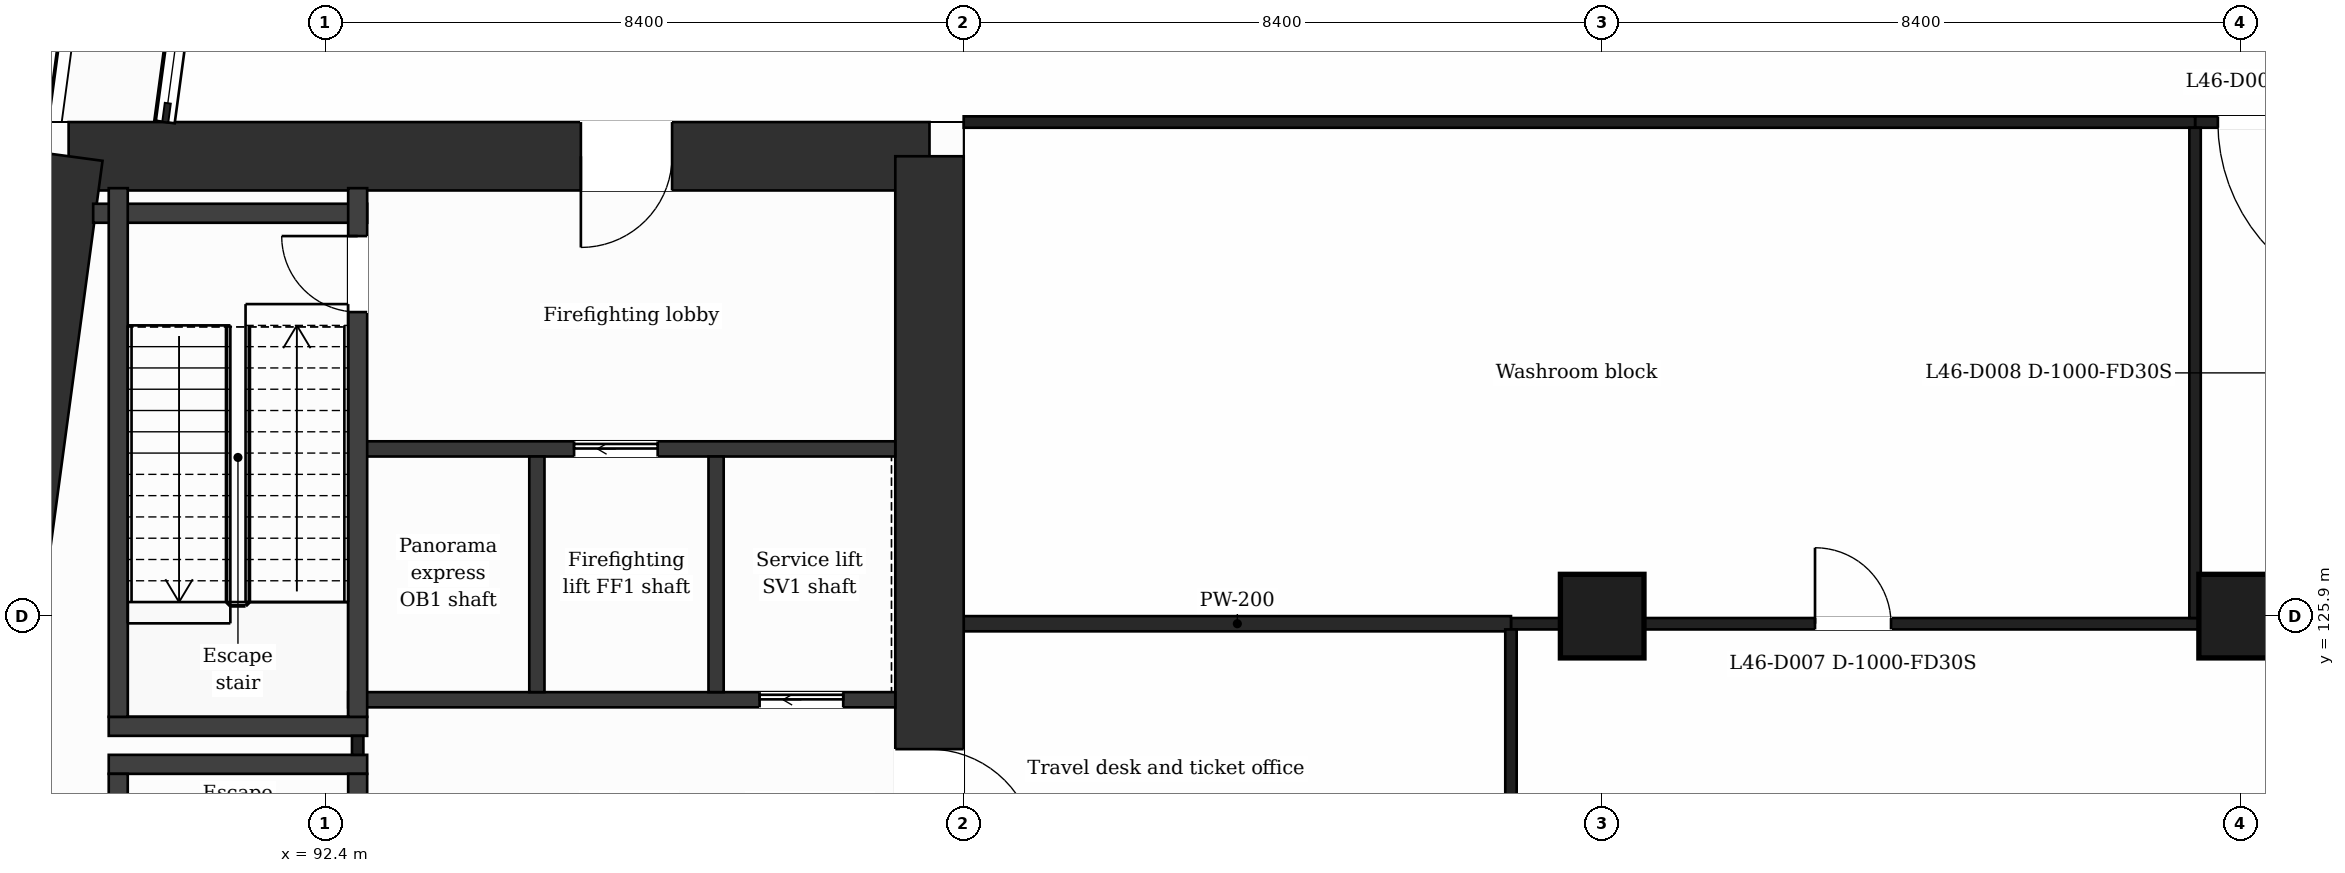
"""IFC4 building model, lengths in metres.
Left out: names, types, materials, properties, quantities, classifications, styles, units other than length and angle.
Written with IfcOpenShell. Run it as: python <this file> out.ifc"""

import sys

from ifc_helpers import new_model, si_unit, direction, frame, frame_2d, origin, origin_2d, place, context, subcontext, project, spatial, rectangle, extrude, element, fill, save


model = new_model("IFC4")
c1 = context("Model", 3, precision=1e-05, world=origin(), true_north=direction((0.0, 1.0)))
c2 = subcontext(c1, "Body", "Model", "MODEL_VIEW")
j1 = project(units=[si_unit("LENGTHUNIT", "METRE"), si_unit("PLANEANGLEUNIT", "RADIAN")], contexts=[c1])
p1 = place(None, origin())
s1 = spatial("IfcSite", under=j1, at=p1, CompositionType="ELEMENT")
p2 = place(p1, origin())
s2 = spatial("IfcBuilding", under=s1, at=p2, CompositionType="ELEMENT")
p3 = place(p2, frame((0.0, 0.0, 192.2)))
s3 = spatial("IfcBuildingStorey", under=s2, at=p3, CompositionType="ELEMENT", Elevation=192.2)
p4 = place(p3, frame((89.024, 131.95, 0.0), z_axis=(0.0, 0.0, 1.0), x_axis=(1.0, 0.0, 0.0)))
e1 = element("IfcWall", 1, at=p4, inside=s3, PredefinedType="SHEAR", context=c2, shape_type="SweptSolid", body=[
    extrude(rectangle(XDim=11.326, YDim=0.9, at=frame_2d((5.663, 0.0))), origin(), (0.0, 0.0, 1.0), 5.0),
])
p5 = place(p4, frame((6.739, 0.0, 0.0)))
e2 = element("IfcOpeningElement", 2, at=p5, cuts=e1, PredefinedType="OPENING", context=c2, shape_type="SweptSolid", body=[
    extrude(rectangle(XDim=1.2, YDim=2.1, at=frame_2d((0.6, 1.05))), frame((0.0, 0.46, 0.0), z_axis=(0.0, -1.0, 0.0), x_axis=(1.0, 0.0, 0.0)), (0.0, 0.0, 1.0), 0.92),
])
p6 = place(p3, frame((100.35, 131.95, 0.0), z_axis=(0.0, 0.0, 1.0), x_axis=(0.0, -1.0, 0.0)))
e3 = element("IfcWall", 3, at=p6, inside=s3, PredefinedType="SHEAR", context=c2, shape_type="SweptSolid", body=[
    extrude(rectangle(XDim=21.1, YDim=0.9, at=frame_2d((10.55, 0.0))), origin(), (0.0, 0.0, 1.0), 5.0),
])
p7 = place(p6, frame((7.8, 0.0, 0.0)))
e4 = element("IfcOpeningElement", 4, at=p7, cuts=e3, PredefinedType="OPENING", context=c2, shape_type="SweptSolid", body=[
    extrude(rectangle(XDim=1.4, YDim=2.1, at=frame_2d((0.7, 1.05))), frame((0.0, 0.46, 0.0), z_axis=(0.0, -1.0, 0.0), x_axis=(1.0, 0.0, 0.0)), (0.0, 0.0, 1.0), 0.92),
])
p8 = place(p3, frame((86.184, 110.85, 0.0), z_axis=(0.0, 0.0, 1.0), x_axis=(0.133410495943, 0.991060865725, 0.0)))
e5 = element("IfcWall", 5, at=p8, inside=s3, PredefinedType="SHEAR", context=c2, shape_type="SweptSolid", body=[
    extrude(rectangle(XDim=21.29, YDim=0.9, at=frame_2d((10.645, 0.0))), origin(), (0.0, 0.0, 1.0), 5.0),
])
for number, where, z_axis, x_axis in (
    (6, (109.2, 125.9, 0.0), (0.0, 0.0, 1.0), (1.0, 0.0, 0.0)),
    (7, (117.6, 125.9, 0.0), (0.0, 0.0, 1.0), (1.0, 0.0, 0.0)),
):
    element("IfcColumn", number, at=place(p3, frame(where, z_axis=z_axis, x_axis=x_axis)), inside=s3, PredefinedType="COLUMN", context=c2, shape_type="SweptSolid", body=[
        extrude(rectangle(XDim=1.1, YDim=1.1, at=origin_2d()), origin(), (0.0, 0.0, 1.0), 5.0),
    ])
for number, where, z_axis, x_axis in (
    (8, (89.552, 123.95, 0.0), (0.0, 0.0, 1.0), (1.0, 0.0, 0.0)),
    (9, (89.552, 124.45, 0.0), (0.0, 0.0, 1.0), (1.0, 0.0, 0.0)),
):
    element("IfcWall", number, at=place(p3, frame(where, z_axis=z_axis, x_axis=x_axis)), inside=s3, PredefinedType="PARTITIONING", context=c2, shape_type="SweptSolid", body=[
        extrude(rectangle(XDim=3.4, YDim=0.25, at=frame_2d((1.7, 0.0))), origin(), (0.0, 0.0, 1.0), 4.5),
    ])
p9 = place(p3, frame((92.702, 124.8, 0.0), z_axis=(0.0, 0.0, 1.0), x_axis=(1.0, 0.0, 0.0)))
e10 = element("IfcWall", 10, at=p9, inside=s3, PredefinedType="PARTITIONING", context=c2, shape_type="SweptSolid", body=[
    extrude(rectangle(XDim=7.198, YDim=0.2, at=frame_2d((3.599, 0.0))), origin(), (0.0, 0.0, 1.0), 4.5),
])
p10 = place(p9, frame((5.413, 0.0, 0.0)))
e11 = element("IfcOpeningElement", 11, at=p10, cuts=e10, PredefinedType="OPENING", context=c2, shape_type="SweptSolid", body=[
    extrude(rectangle(XDim=1.1, YDim=2.1, at=frame_2d((0.55, 1.05))), frame((0.0, 0.11, 0.0), z_axis=(0.0, -1.0, 0.0), x_axis=(1.0, 0.0, 0.0)), (0.0, 0.0, 1.0), 0.22),
])
p11 = place(p3, frame((108.0, 125.8, 0.0), z_axis=(0.0, 0.0, 1.0), x_axis=(1.0, 0.0, 0.0)))
e12 = element("IfcWall", 12, at=p11, inside=s3, PredefinedType="PARTITIONING", context=c2, shape_type="SweptSolid", body=[
    extrude(rectangle(XDim=9.075, YDim=0.15, at=frame_2d((4.538, 0.0))), origin(), (0.0, 0.0, 1.0), 4.5),
])
p12 = place(p11, frame((4.0, 0.0, 0.0)))
e13 = element("IfcOpeningElement", 13, at=p12, cuts=e12, PredefinedType="OPENING", context=c2, shape_type="SweptSolid", body=[
    extrude(rectangle(XDim=1.0, YDim=2.1, at=frame_2d((0.5, 1.05))), frame((0.0, 0.085, 0.0), z_axis=(0.0, -1.0, 0.0), x_axis=(1.0, 0.0, 0.0)), (0.0, 0.0, 1.0), 0.17),
])
p13 = place(p3, frame((100.8, 125.8, 0.0), z_axis=(0.0, 0.0, 1.0), x_axis=(1.0, 0.0, 0.0)))
e14 = element("IfcWall", 14, at=p13, inside=s3, PredefinedType="PARTITIONING", context=c2, shape_type="SweptSolid", body=[
    extrude(rectangle(XDim=7.2, YDim=0.2, at=frame_2d((3.6, 0.0))), origin(), (0.0, 0.0, 1.0), 4.5),
])
p14 = place(p3, frame((92.827, 128.1, 0.0), z_axis=(0.0, 0.0, 1.0), x_axis=(1.0, 0.0, 0.0)))
e15 = element("IfcWall", 15, at=p14, inside=s3, PredefinedType="PARTITIONING", context=c2, shape_type="SweptSolid", body=[
    extrude(rectangle(XDim=7.073, YDim=0.2, at=frame_2d((3.537, 0.0))), origin(), (0.0, 0.0, 1.0), 4.5),
])
p15 = place(p14, frame((2.847, 0.0, 0.0)))
e16 = element("IfcOpeningElement", 16, at=p15, cuts=e15, PredefinedType="OPENING", context=c2, shape_type="SweptSolid", body=[
    extrude(rectangle(XDim=1.1, YDim=2.1, at=frame_2d((0.55, 1.05))), frame((0.0, 0.11, 0.0), z_axis=(0.0, -1.0, 0.0), x_axis=(1.0, 0.0, 0.0)), (0.0, 0.0, 1.0), 0.22),
])
p16 = place(p3, frame((89.347, 131.2, 0.0), z_axis=(0.0, 0.0, 1.0), x_axis=(1.0, 0.0, 0.0)))
e17 = element("IfcWall", 17, at=p16, inside=s3, PredefinedType="PARTITIONING", context=c2, shape_type="SweptSolid", body=[
    extrude(rectangle(XDim=3.604, YDim=0.25, at=frame_2d((1.802, 0.0))), origin(), (0.0, 0.0, 1.0), 4.5),
])
p17 = place(p3, frame((117.0, 132.4, 0.0), z_axis=(0.0, 0.0, 1.0), x_axis=(1.0, 0.0, 0.0)))
e18 = element("IfcWall", 18, at=p17, inside=s3, PredefinedType="PARTITIONING", context=c2, shape_type="SweptSolid", body=[
    extrude(rectangle(XDim=3.0, YDim=0.15, at=frame_2d((1.5, 0.0))), origin(), (0.0, 0.0, 1.0), 4.5),
])
p18 = place(p17, frame((0.3, 0.0, 0.0)))
e19 = element("IfcOpeningElement", 19, at=p18, cuts=e18, PredefinedType="OPENING", context=c2, shape_type="SweptSolid", body=[
    extrude(rectangle(XDim=2.4, YDim=2.1, at=frame_2d((1.2, 1.05))), frame((0.0, 0.085, 0.0), z_axis=(0.0, -1.0, 0.0), x_axis=(1.0, 0.0, 0.0)), (0.0, 0.0, 1.0), 0.17),
])
p19 = place(p3, frame((100.8, 132.4, 0.0), z_axis=(0.0, 0.0, 1.0), x_axis=(1.0, 0.0, 0.0)))
e20 = element("IfcWall", 20, at=p19, inside=s3, PredefinedType="PARTITIONING", context=c2, shape_type="SweptSolid", body=[
    extrude(rectangle(XDim=16.2, YDim=0.15, at=frame_2d((8.1, 0.0))), origin(), (0.0, 0.0, 1.0), 4.5),
])
p20 = place(p3, frame((89.677, 116.87, 0.0), z_axis=(0.0, 0.0, 1.0), x_axis=(0.0, 1.0, 0.0)))
e21 = element("IfcWall", 21, at=p20, inside=s3, PredefinedType="PARTITIONING", context=c2, shape_type="SweptSolid", body=[
    extrude(rectangle(XDim=6.955, YDim=0.25, at=frame_2d((3.478, 0.0))), origin(), (0.0, 0.0, 1.0), 4.5),
])
p21 = place(p3, frame((89.677, 124.575, 0.0), z_axis=(0.0, 0.0, 1.0), x_axis=(0.0, 1.0, 0.0)))
e22 = element("IfcWall", 22, at=p21, inside=s3, PredefinedType="PARTITIONING", context=c2, shape_type="SweptSolid", body=[
    extrude(rectangle(XDim=6.955, YDim=0.25, at=frame_2d((3.478, 0.0))), origin(), (0.0, 0.0, 1.0), 4.5),
])
p22 = place(p3, frame((92.827, 124.075, 0.0), z_axis=(0.0, 0.0, 1.0), x_axis=(0.0, 1.0, 0.0)))
e23 = element("IfcWall", 23, at=p22, inside=s3, PredefinedType="PARTITIONING", context=c2, shape_type="SweptSolid", body=[
    extrude(rectangle(XDim=0.25, YDim=0.15, at=frame_2d((0.125, 0.0))), origin(), (0.0, 0.0, 1.0), 4.5),
])
p23 = place(p3, frame((92.827, 116.87, 0.0), z_axis=(0.0, 0.0, 1.0), x_axis=(0.0, 1.0, 0.0)))
e24 = element("IfcWall", 24, at=p23, inside=s3, PredefinedType="PARTITIONING", context=c2, shape_type="SweptSolid", body=[
    extrude(rectangle(XDim=6.955, YDim=0.25, at=frame_2d((3.478, 0.0))), origin(), (0.0, 0.0, 1.0), 4.5),
])
p24 = place(p23, frame((5.655, 0.0, 0.0)))
e25 = element("IfcOpeningElement", 25, at=p24, cuts=e24, PredefinedType="OPENING", context=c2, shape_type="SweptSolid", body=[
    extrude(rectangle(XDim=0.95, YDim=2.1, at=frame_2d((0.475, 1.05))), frame((0.0, 0.135, 0.0), z_axis=(0.0, -1.0, 0.0), x_axis=(1.0, 0.0, 0.0)), (0.0, 0.0, 1.0), 0.27),
])
p25 = place(p3, frame((92.827, 124.575, 0.0), z_axis=(0.0, 0.0, 1.0), x_axis=(0.0, 1.0, 0.0)))
e26 = element("IfcWall", 26, at=p25, inside=s3, PredefinedType="PARTITIONING", context=c2, shape_type="SweptSolid", body=[
    extrude(rectangle(XDim=6.955, YDim=0.25, at=frame_2d((3.478, 0.0))), origin(), (0.0, 0.0, 1.0), 4.5),
])
p26 = place(p25, frame((5.325, 0.0, 0.0)))
e27 = element("IfcOpeningElement", 27, at=p26, cuts=e26, PredefinedType="OPENING", context=c2, shape_type="SweptSolid", body=[
    extrude(rectangle(XDim=1.0, YDim=2.1, at=frame_2d((0.5, 1.05))), frame((0.0, 0.135, 0.0), z_axis=(0.0, -1.0, 0.0), x_axis=(1.0, 0.0, 0.0)), (0.0, 0.0, 1.0), 0.27),
])
for number, where, z_axis, x_axis in (
    (28, (95.185, 124.9, 0.0), (0.0, 0.0, 1.0), (0.0, 1.0, 0.0)),
    (29, (97.542, 124.9, 0.0), (0.0, 0.0, 1.0), (0.0, 1.0, 0.0)),
):
    element("IfcWall", number, at=place(p3, frame(where, z_axis=z_axis, x_axis=x_axis)), inside=s3, PredefinedType="PARTITIONING", context=c2, shape_type="SweptSolid", body=[
        extrude(rectangle(XDim=3.1, YDim=0.2, at=frame_2d((1.55, 0.0))), origin(), (0.0, 0.0, 1.0), 4.5),
    ])
p27 = place(p3, frame((108.0, 120.375, 0.0), z_axis=(0.0, 0.0, 1.0), x_axis=(0.0, 1.0, 0.0)))
e30 = element("IfcWall", 30, at=p27, inside=s3, PredefinedType="PARTITIONING", context=c2, shape_type="SweptSolid", body=[
    extrude(rectangle(XDim=5.35, YDim=0.15, at=frame_2d((2.675, 0.0))), origin(), (0.0, 0.0, 1.0), 4.5),
])
p28 = place(p3, frame((117.0, 125.875, 0.0), z_axis=(0.0, 0.0, 1.0), x_axis=(0.0, 1.0, 0.0)))
e31 = element("IfcWall", 31, at=p28, inside=s3, PredefinedType="PARTITIONING", context=c2, shape_type="SweptSolid", body=[
    extrude(rectangle(XDim=6.45, YDim=0.15, at=frame_2d((3.225, 0.0))), origin(), (0.0, 0.0, 1.0), 4.5),
])
p29 = place(p18, origin())
e32 = element("IfcDoor", 32, at=p29, inside=s3, OperationType="SINGLE_SWING_RIGHT", PredefinedType="DOOR", context=c2, shape_type="SweptSolid", body=[
    extrude(rectangle(XDim=2.4, YDim=2.1, at=frame_2d((1.2, 1.05))), frame((0.0, 0.025, 0.0), z_axis=(0.0, -1.0, 0.0), x_axis=(1.0, 0.0, 0.0)), (0.0, 0.0, 1.0), 0.05),
])
fill(e19, e32)
p30 = place(p12, origin())
e33 = element("IfcDoor", 33, at=p30, inside=s3, OperationType="SINGLE_SWING_LEFT", PredefinedType="DOOR", context=c2, shape_type="SweptSolid", body=[
    extrude(rectangle(XDim=1.0, YDim=2.1, at=frame_2d((0.5, 1.05))), frame((0.0, 0.025, 0.0), z_axis=(0.0, -1.0, 0.0), x_axis=(1.0, 0.0, 0.0)), (0.0, 0.0, 1.0), 0.05),
])
fill(e13, e33)
p31 = place(p15, origin())
e34 = element("IfcDoor", 34, at=p31, inside=s3, OperationType="SLIDING_TO_LEFT", PredefinedType="DOOR", context=c2, shape_type="SweptSolid", body=[
    extrude(rectangle(XDim=1.1, YDim=2.1, at=frame_2d((0.55, 1.05))), frame((0.0, 0.025, 0.0), z_axis=(0.0, -1.0, 0.0), x_axis=(1.0, 0.0, 0.0)), (0.0, 0.0, 1.0), 0.05),
])
fill(e16, e34)
p32 = place(p10, origin())
e35 = element("IfcDoor", 35, at=p32, inside=s3, OperationType="SLIDING_TO_LEFT", PredefinedType="DOOR", context=c2, shape_type="SweptSolid", body=[
    extrude(rectangle(XDim=1.1, YDim=2.1, at=frame_2d((0.55, 1.05))), frame((0.0, 0.025, 0.0), z_axis=(0.0, -1.0, 0.0), x_axis=(1.0, 0.0, 0.0)), (0.0, 0.0, 1.0), 0.05),
])
fill(e11, e35)
p33 = place(p26, origin())
e36 = element("IfcDoor", 36, at=p33, inside=s3, OperationType="SINGLE_SWING_RIGHT", PredefinedType="DOOR", context=c2, shape_type="SweptSolid", body=[
    extrude(rectangle(XDim=1.0, YDim=2.1, at=frame_2d((0.5, 1.05))), frame((0.0, 0.025, 0.0), z_axis=(0.0, -1.0, 0.0), x_axis=(1.0, 0.0, 0.0)), (0.0, 0.0, 1.0), 0.05),
])
fill(e27, e36)
p34 = place(p5, origin())
e37 = element("IfcDoor", 37, at=p34, inside=s3, OperationType="SINGLE_SWING_LEFT", PredefinedType="DOOR", context=c2, shape_type="SweptSolid", body=[
    extrude(rectangle(XDim=1.2, YDim=2.1, at=frame_2d((0.6, 1.05))), frame((0.0, 0.025, 0.0), z_axis=(0.0, -1.0, 0.0), x_axis=(1.0, 0.0, 0.0)), (0.0, 0.0, 1.0), 0.05),
])
fill(e2, e37)
p35 = place(p7, origin())
e38 = element("IfcDoor", 38, at=p35, inside=s3, OperationType="SINGLE_SWING_RIGHT", PredefinedType="DOOR", context=c2, shape_type="SweptSolid", body=[
    extrude(rectangle(XDim=1.4, YDim=2.1, at=frame_2d((0.7, 1.05))), frame((0.0, 0.025, 0.0), z_axis=(0.0, -1.0, 0.0), x_axis=(1.0, 0.0, 0.0)), (0.0, 0.0, 1.0), 0.05),
])
fill(e4, e38)
save(model, sys.argv[1])
